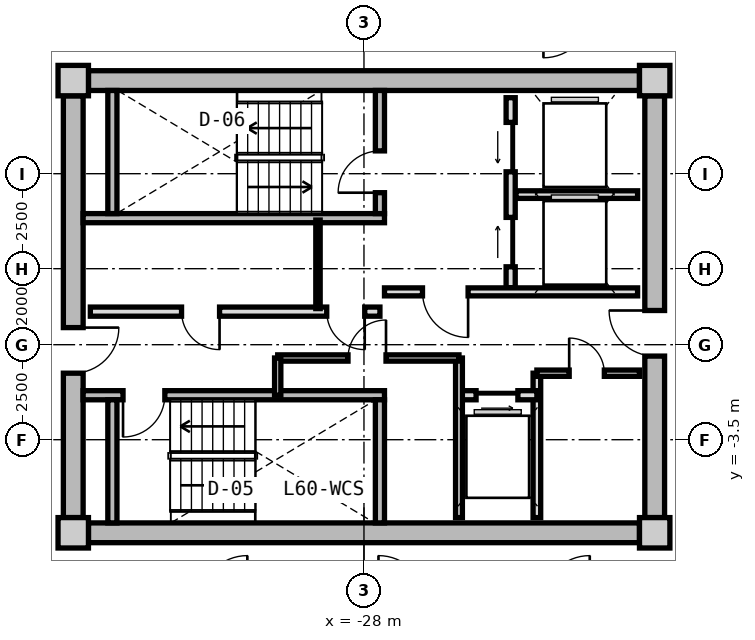
"""IFC4 building model, lengths in metres.
Left out: names, types, materials, properties, quantities, classifications, styles, units other than length and angle.
Written with IfcOpenShell. Run it as: python <this file> out.ifc"""

import sys

from ifc_helpers import new_model, si_unit, direction, frame, frame_2d, origin, origin_2d, place, context, subcontext, project, spatial, rectangle, extrude, source, transform, mapped, element, fill, save


model = new_model("IFC4")
c1 = context("Model", 3, precision=1e-05, world=origin(), true_north=direction((0.0, 1.0)))
c2 = subcontext(c1, "Body", "Model", "MODEL_VIEW")
j1 = project(units=[si_unit("LENGTHUNIT", "METRE"), si_unit("PLANEANGLEUNIT", "RADIAN")], contexts=[c1])
p1 = place(None, origin())
s1 = spatial("IfcSite", under=j1, at=p1, CompositionType="ELEMENT")
p2 = place(p1, origin())
s2 = spatial("IfcBuilding", under=s1, at=p2, CompositionType="ELEMENT")
p3 = place(p2, frame((0.0, 0.0, 193.7)))
s3 = spatial("IfcBuildingStorey", under=s2, at=p3, CompositionType="ELEMENT", Elevation=193.7)
m1 = source(origin(), c2, "Body", "SweptSolid", [
    extrude(rectangle(XDim=0.8, YDim=0.8, at=origin_2d()), origin(), (0.0, 0.0, 1.0), 3.05),
])
for number, where, z_axis, x_axis in (
    (1, (-35.65, -5.95, 0.0), (0.0, 0.0, 1.0), (1.0, 0.0, 0.0)),
    (2, (-20.35, -5.95, 0.0), (0.0, 0.0, 1.0), (1.0, 0.0, 0.0)),
    (3, (-20.35, 5.95, 0.0), (0.0, 0.0, 1.0), (1.0, 0.0, 0.0)),
    (4, (-35.65, 5.95, 0.0), (0.0, 0.0, 1.0), (1.0, 0.0, 0.0)),
):
    element("IfcColumn", number, at=place(p3, frame(where, z_axis=z_axis, x_axis=x_axis)), inside=s3, PredefinedType="COLUMN", context=c2, shape_type="MappedRepresentation", body=[
        mapped(m1, transform((0.0, 0.0, 0.0), x_axis=(1.0, 0.0, 0.0), y_axis=(0.0, 1.0, 0.0), z_axis=(0.0, 0.0, 1.0), scale=1.0)),
    ])
m2 = source(origin(), c2, "Body", "SweptSolid", [
    extrude(rectangle(XDim=14.5, YDim=0.52, at=frame_2d((7.25, 0.0))), origin(), (0.0, 0.0, 1.0), 2.81),
])
for number, where, z_axis, x_axis in (
    (5, (-35.25, 5.95, 0.0), (0.0, 0.0, 1.0), (1.0, 0.0, 0.0)),
    (6, (-20.75, -5.95, 0.0), (0.0, 0.0, 1.0), (-1.0, 0.0, 0.0)),
):
    element("IfcWall", number, at=place(p3, frame(where, z_axis=z_axis, x_axis=x_axis)), inside=s3, PredefinedType="SHEAR", context=c2, shape_type="MappedRepresentation", body=[
        mapped(m2, transform((0.0, 0.0, 0.0), x_axis=(1.0, 0.0, 0.0), y_axis=(0.0, 1.0, 0.0), z_axis=(0.0, 0.0, 1.0), scale=1.0)),
    ])
m3 = source(origin(), c2, "Body", "SweptSolid", [
    extrude(rectangle(XDim=11.1, YDim=0.52, at=frame_2d((5.55, 0.0))), origin(), (0.0, 0.0, 1.0), 2.81),
])
p4 = place(p3, frame((-35.65, -5.55, 0.0), z_axis=(0.0, 0.0, 1.0), x_axis=(0.0, 1.0, 0.0)))
e7 = element("IfcWall", 7, at=p4, inside=s3, PredefinedType="SHEAR", context=c2, shape_type="MappedRepresentation", body=[
    mapped(m3, transform((0.0, 0.0, 0.0), x_axis=(1.0, 0.0, 0.0), y_axis=(0.0, 1.0, 0.0), z_axis=(0.0, 0.0, 1.0), scale=1.0)),
])
p5 = place(p4, frame((3.8, 0.0, 0.0)))
e8 = element("IfcOpeningElement", 8, at=p5, cuts=e7, PredefinedType="OPENING", context=c2, shape_type="SweptSolid", body=[
    extrude(rectangle(XDim=1.2, YDim=2.15, at=frame_2d((0.6, 1.075))), frame((0.0, 0.27, 0.0), z_axis=(0.0, -1.0, 0.0), x_axis=(1.0, 0.0, 0.0)), (0.0, 0.0, 1.0), 0.54),
])
p6 = place(p3, frame((-20.35, 5.55, 0.0), z_axis=(0.0, 0.0, 1.0), x_axis=(0.0, -1.0, 0.0)))
e9 = element("IfcWall", 9, at=p6, inside=s3, PredefinedType="SHEAR", context=c2, shape_type="MappedRepresentation", body=[
    mapped(m3, transform((0.0, 0.0, 0.0), x_axis=(1.0, 0.0, 0.0), y_axis=(0.0, 1.0, 0.0), z_axis=(0.0, 0.0, 1.0), scale=1.0)),
])
p7 = place(p6, frame((5.65, 0.0, 0.0)))
e10 = element("IfcOpeningElement", 10, at=p7, cuts=e9, PredefinedType="OPENING", context=c2, shape_type="SweptSolid", body=[
    extrude(rectangle(XDim=1.2, YDim=2.15, at=frame_2d((0.6, 1.075))), frame((0.0, 0.27, 0.0), z_axis=(0.0, -1.0, 0.0), x_axis=(1.0, 0.0, 0.0)), (0.0, 0.0, 1.0), 0.54),
])
m4 = source(origin(), c2, "Body", "SweptSolid", [
    extrude(rectangle(XDim=7.93, YDim=0.24, at=frame_2d((3.965, 0.0))), origin(), (0.0, 0.0, 1.0), 2.81),
])
p8 = place(p3, frame((-35.39, 2.33, 0.0), z_axis=(0.0, 0.0, 1.0), x_axis=(1.0, 0.0, 0.0)))
e11 = element("IfcWall", 11, at=p8, inside=s3, PredefinedType="PARTITIONING", context=c2, shape_type="MappedRepresentation", body=[
    mapped(m4, transform((0.0, 0.0, 0.0), x_axis=(1.0, 0.0, 0.0), y_axis=(0.0, 1.0, 0.0), z_axis=(0.0, 0.0, 1.0), scale=1.0)),
])
m5 = source(origin(), c2, "Body", "SweptSolid", [
    extrude(rectangle(XDim=3.24, YDim=0.24, at=frame_2d((1.62, 0.0))), origin(), (0.0, 0.0, 1.0), 2.81),
])
p9 = place(p3, frame((-34.62, 2.45, 0.0), z_axis=(0.0, 0.0, 1.0), x_axis=(0.0, 1.0, 0.0)))
e12 = element("IfcWall", 12, at=p9, inside=s3, PredefinedType="PARTITIONING", context=c2, shape_type="MappedRepresentation", body=[
    mapped(m5, transform((0.0, 0.0, 0.0), x_axis=(1.0, 0.0, 0.0), y_axis=(0.0, 1.0, 0.0), z_axis=(0.0, 0.0, 1.0), scale=1.0)),
])
p10 = place(p3, frame((-27.58, 2.45, 0.0), z_axis=(0.0, 0.0, 1.0), x_axis=(0.0, 1.0, 0.0)))
e13 = element("IfcWall", 13, at=p10, inside=s3, PredefinedType="PARTITIONING", context=c2, shape_type="MappedRepresentation", body=[
    mapped(m5, transform((0.0, 0.0, 0.0), x_axis=(1.0, 0.0, 0.0), y_axis=(0.0, 1.0, 0.0), z_axis=(0.0, 0.0, 1.0), scale=1.0)),
])
p11 = place(p10, frame((0.55, 0.0, 0.0)))
e14 = element("IfcOpeningElement", 14, at=p11, cuts=e13, PredefinedType="OPENING", context=c2, shape_type="SweptSolid", body=[
    extrude(rectangle(XDim=1.1, YDim=2.15, at=frame_2d((0.55, 1.075))), frame((0.0, 0.13, 0.0), z_axis=(0.0, -1.0, 0.0), x_axis=(1.0, 0.0, 0.0)), (0.0, 0.0, 1.0), 0.26),
])
p12 = place(p3, frame((-35.39, -2.33, 0.0), z_axis=(0.0, 0.0, 1.0), x_axis=(1.0, 0.0, 0.0)))
e15 = element("IfcWall", 15, at=p12, inside=s3, PredefinedType="PARTITIONING", context=c2, shape_type="MappedRepresentation", body=[
    mapped(m4, transform((0.0, 0.0, 0.0), x_axis=(1.0, 0.0, 0.0), y_axis=(0.0, 1.0, 0.0), z_axis=(0.0, 0.0, 1.0), scale=1.0)),
])
p13 = place(p12, frame((1.05, 0.0, 0.0)))
e16 = element("IfcOpeningElement", 16, at=p13, cuts=e15, PredefinedType="OPENING", context=c2, shape_type="SweptSolid", body=[
    extrude(rectangle(XDim=1.1, YDim=2.15, at=frame_2d((0.55, 1.075))), frame((0.0, 0.13, 0.0), z_axis=(0.0, -1.0, 0.0), x_axis=(1.0, 0.0, 0.0)), (0.0, 0.0, 1.0), 0.26),
])
for number, where, z_axis, x_axis in (
    (17, (-34.62, -5.69, 0.0), (0.0, 0.0, 1.0), (0.0, 1.0, 0.0)),
    (18, (-27.58, -5.69, 0.0), (0.0, 0.0, 1.0), (0.0, 1.0, 0.0)),
):
    element("IfcWall", number, at=place(p3, frame(where, z_axis=z_axis, x_axis=x_axis)), inside=s3, PredefinedType="PARTITIONING", context=c2, shape_type="MappedRepresentation", body=[
        mapped(m5, transform((0.0, 0.0, 0.0), x_axis=(1.0, 0.0, 0.0), y_axis=(0.0, 1.0, 0.0), z_axis=(0.0, 0.0, 1.0), scale=1.0)),
    ])
m6 = source(origin(), c2, "Body", "SweptSolid", [
    extrude(rectangle(XDim=5.0, YDim=0.24, at=frame_2d((2.5, 0.0))), origin(), (0.0, 0.0, 1.0), 2.795),
])
p14 = place(p3, frame((-24.14, 0.5, 0.0), z_axis=(0.0, 0.0, 1.0), x_axis=(0.0, 1.0, 0.0)))
e19 = element("IfcWall", 19, at=p14, inside=s3, PredefinedType="PARTITIONING", context=c2, shape_type="MappedRepresentation", body=[
    mapped(m6, transform((0.0, 0.0, 0.0), x_axis=(1.0, 0.0, 0.0), y_axis=(0.0, 1.0, 0.0), z_axis=(0.0, 0.0, 1.0), scale=1.0)),
])
p15 = place(p14, frame((3.05, 0.0, 0.0)))
e20 = element("IfcOpeningElement", 20, at=p15, cuts=e19, PredefinedType="OPENING", context=c2, shape_type="SweptSolid", body=[
    extrude(rectangle(XDim=1.3, YDim=2.2, at=frame_2d((0.65, 1.1))), frame((0.0, 0.13, 0.0), z_axis=(0.0, -1.0, 0.0), x_axis=(1.0, 0.0, 0.0)), (0.0, 0.0, 1.0), 0.26),
])
p16 = place(p14, frame((0.55, 0.0, 0.0)))
e21 = element("IfcOpeningElement", 21, at=p16, cuts=e19, PredefinedType="OPENING", context=c2, shape_type="SweptSolid", body=[
    extrude(rectangle(XDim=1.3, YDim=2.2, at=frame_2d((0.65, 1.1))), frame((0.0, 0.13, 0.0), z_axis=(0.0, -1.0, 0.0), x_axis=(1.0, 0.0, 0.0)), (0.0, 0.0, 1.0), 0.26),
])
m7 = source(origin(), c2, "Body", "SweptSolid", [
    extrude(rectangle(XDim=3.2, YDim=0.2, at=frame_2d((1.6, 0.0))), origin(), (0.0, 0.0, 1.0), 2.795),
])
p17 = place(p3, frame((-24.0, 2.95, 0.0), z_axis=(0.0, 0.0, 1.0), x_axis=(1.0, 0.0, 0.0)))
e22 = element("IfcWall", 22, at=p17, inside=s3, PredefinedType="PARTITIONING", context=c2, shape_type="MappedRepresentation", body=[
    mapped(m7, transform((0.0, 0.0, 0.0), x_axis=(1.0, 0.0, 0.0), y_axis=(0.0, 1.0, 0.0), z_axis=(0.0, 0.0, 1.0), scale=1.0)),
])
m8 = source(origin(), c2, "Body", "SweptSolid", [
    extrude(rectangle(XDim=6.66, YDim=0.21, at=frame_2d((3.33, 0.0))), origin(), (0.0, 0.0, 1.0), 2.795),
])
p18 = place(p3, frame((-27.46, 0.39, 0.0), z_axis=(0.0, 0.0, 1.0), x_axis=(1.0, 0.0, 0.0)))
e23 = element("IfcWall", 23, at=p18, inside=s3, PredefinedType="PARTITIONING", context=c2, shape_type="MappedRepresentation", body=[
    mapped(m8, transform((0.0, 0.0, 0.0), x_axis=(1.0, 0.0, 0.0), y_axis=(0.0, 1.0, 0.0), z_axis=(0.0, 0.0, 1.0), scale=1.0)),
])
p19 = place(p18, frame((1.0, 0.0, 0.0)))
e24 = element("IfcOpeningElement", 24, at=p19, cuts=e23, PredefinedType="OPENING", context=c2, shape_type="SweptSolid", body=[
    extrude(rectangle(XDim=1.2, YDim=2.15, at=frame_2d((0.6, 1.075))), frame((0.0, 0.115, 0.0), z_axis=(0.0, -1.0, 0.0), x_axis=(1.0, 0.0, 0.0)), (0.0, 0.0, 1.0), 0.23),
])
m9 = source(origin(), c2, "Body", "SweptSolid", [
    extrude(rectangle(XDim=7.62, YDim=0.24, at=frame_2d((3.81, 0.0))), origin(), (0.0, 0.0, 1.0), 2.795),
])
p20 = place(p3, frame((-35.2, -0.13, 0.0), z_axis=(0.0, 0.0, 1.0), x_axis=(1.0, 0.0, 0.0)))
e25 = element("IfcWall", 25, at=p20, inside=s3, PredefinedType="PARTITIONING", context=c2, shape_type="MappedRepresentation", body=[
    mapped(m9, transform((0.0, 0.0, 0.0), x_axis=(1.0, 0.0, 0.0), y_axis=(0.0, 1.0, 0.0), z_axis=(0.0, 0.0, 1.0), scale=1.0)),
])
p21 = place(p20, frame((6.22, 0.0, 0.0)))
e26 = element("IfcOpeningElement", 26, at=p21, cuts=e25, PredefinedType="OPENING", context=c2, shape_type="SweptSolid", body=[
    extrude(rectangle(XDim=1.0, YDim=2.1, at=frame_2d((0.5, 1.05))), frame((0.0, 0.13, 0.0), z_axis=(0.0, -1.0, 0.0), x_axis=(1.0, 0.0, 0.0)), (0.0, 0.0, 1.0), 0.26),
])
p22 = place(p20, frame((2.4, 0.0, 0.0)))
e27 = element("IfcOpeningElement", 27, at=p22, cuts=e25, PredefinedType="OPENING", context=c2, shape_type="SweptSolid", body=[
    extrude(rectangle(XDim=1.0, YDim=2.1, at=frame_2d((0.5, 1.05))), frame((0.0, 0.13, 0.0), z_axis=(0.0, -1.0, 0.0), x_axis=(1.0, 0.0, 0.0)), (0.0, 0.0, 1.0), 0.26),
])
m10 = source(origin(), c2, "Body", "SweptSolid", [
    extrude(rectangle(XDim=2.33, YDim=0.115, at=frame_2d((1.165, 0.0))), origin(), (0.0, 0.0, 1.0), 2.795),
])
p23 = place(p3, frame((-29.21, -0.05, 0.0), z_axis=(0.0, 0.0, 1.0), x_axis=(0.0, 1.0, 0.0)))
e28 = element("IfcWall", 28, at=p23, inside=s3, PredefinedType="PARTITIONING", context=c2, shape_type="MappedRepresentation", body=[
    mapped(m10, transform((0.0, 0.0, 0.0), x_axis=(1.0, 0.0, 0.0), y_axis=(0.0, 1.0, 0.0), z_axis=(0.0, 0.0, 1.0), scale=1.0)),
])
m11 = source(origin(), c2, "Body", "SweptSolid", [
    extrude(rectangle(XDim=3.8, YDim=0.2, at=frame_2d((1.9, 0.0))), origin(), (0.0, 0.0, 1.0), 2.795),
])
p24 = place(p3, frame((-23.45, -5.55, 0.0), z_axis=(0.0, 0.0, 1.0), x_axis=(0.0, 1.0, 0.0)))
e29 = element("IfcWall", 29, at=p24, inside=s3, PredefinedType="PARTITIONING", context=c2, shape_type="MappedRepresentation", body=[
    mapped(m11, transform((0.0, 0.0, 0.0), x_axis=(1.0, 0.0, 0.0), y_axis=(0.0, 1.0, 0.0), z_axis=(0.0, 0.0, 1.0), scale=1.0)),
])
m12 = source(origin(), c2, "Body", "SweptSolid", [
    extrude(rectangle(XDim=2.05, YDim=0.24, at=frame_2d((1.025, 0.0))), origin(), (0.0, 0.0, 1.0), 2.795),
])
p25 = place(p3, frame((-25.5, -2.33, 0.0), z_axis=(0.0, 0.0, 1.0), x_axis=(1.0, 0.0, 0.0)))
e30 = element("IfcWall", 30, at=p25, inside=s3, PredefinedType="PARTITIONING", context=c2, shape_type="MappedRepresentation", body=[
    mapped(m12, transform((0.0, 0.0, 0.0), x_axis=(1.0, 0.0, 0.0), y_axis=(0.0, 1.0, 0.0), z_axis=(0.0, 0.0, 1.0), scale=1.0)),
])
p26 = place(p25, frame((0.45, 0.0, 0.0)))
e31 = element("IfcOpeningElement", 31, at=p26, cuts=e30, PredefinedType="OPENING", context=c2, shape_type="SweptSolid", body=[
    extrude(rectangle(XDim=1.1, YDim=2.2, at=frame_2d((0.55, 1.1))), frame((0.0, 0.13, 0.0), z_axis=(0.0, -1.0, 0.0), x_axis=(1.0, 0.0, 0.0)), (0.0, 0.0, 1.0), 0.26),
])
m13 = source(origin(), c2, "Body", "SweptSolid", [
    extrude(rectangle(XDim=4.2, YDim=0.18, at=frame_2d((2.1, 0.0))), origin(), (0.0, 0.0, 1.0), 2.795),
])
p27 = place(p3, frame((-25.5, -5.55, 0.0), z_axis=(0.0, 0.0, 1.0), x_axis=(0.0, 1.0, 0.0)))
e32 = element("IfcWall", 32, at=p27, inside=s3, PredefinedType="PARTITIONING", context=c2, shape_type="MappedRepresentation", body=[
    mapped(m13, transform((0.0, 0.0, 0.0), x_axis=(1.0, 0.0, 0.0), y_axis=(0.0, 1.0, 0.0), z_axis=(0.0, 0.0, 1.0), scale=1.0)),
])
m14 = source(origin(), c2, "Body", "SweptSolid", [
    extrude(rectangle(XDim=4.77, YDim=0.165, at=frame_2d((2.385, 0.0))), origin(), (0.0, 0.0, 1.0), 2.795),
])
p28 = place(p3, frame((-30.27, -1.35, 0.0), z_axis=(0.0, 0.0, 1.0), x_axis=(1.0, 0.0, 0.0)))
e33 = element("IfcWall", 33, at=p28, inside=s3, PredefinedType="PARTITIONING", context=c2, shape_type="MappedRepresentation", body=[
    mapped(m14, transform((0.0, 0.0, 0.0), x_axis=(1.0, 0.0, 0.0), y_axis=(0.0, 1.0, 0.0), z_axis=(0.0, 0.0, 1.0), scale=1.0)),
])
p29 = place(p28, frame((1.85, 0.0, 0.0)))
e34 = element("IfcOpeningElement", 34, at=p29, cuts=e33, PredefinedType="OPENING", context=c2, shape_type="SweptSolid", body=[
    extrude(rectangle(XDim=1.0, YDim=2.1, at=frame_2d((0.5, 1.05))), frame((0.0, 0.093, 0.0), z_axis=(0.0, -1.0, 0.0), x_axis=(1.0, 0.0, 0.0)), (0.0, 0.0, 1.0), 0.185),
])
m15 = source(origin(), c2, "Body", "SweptSolid", [
    extrude(rectangle(XDim=0.98, YDim=0.165, at=frame_2d((0.49, 0.0))), origin(), (0.0, 0.0, 1.0), 2.795),
])
p30 = place(p3, frame((-30.27, -2.33, 0.0), z_axis=(0.0, 0.0, 1.0), x_axis=(0.0, 1.0, 0.0)))
e35 = element("IfcWall", 35, at=p30, inside=s3, PredefinedType="PARTITIONING", context=c2, shape_type="MappedRepresentation", body=[
    mapped(m15, transform((0.0, 0.0, 0.0), x_axis=(1.0, 0.0, 0.0), y_axis=(0.0, 1.0, 0.0), z_axis=(0.0, 0.0, 1.0), scale=1.0)),
])
m16 = source(origin(), c2, "Body", "SweptSolid", [
    extrude(rectangle(XDim=2.7, YDim=0.165, at=frame_2d((1.35, 0.0))), origin(), (0.0, 0.0, 1.0), 2.795),
])
p31 = place(p3, frame((-23.45, -1.75, 0.0), z_axis=(0.0, 0.0, 1.0), x_axis=(1.0, 0.0, 0.0)))
e36 = element("IfcWall", 36, at=p31, inside=s3, PredefinedType="PARTITIONING", context=c2, shape_type="MappedRepresentation", body=[
    mapped(m16, transform((0.0, 0.0, 0.0), x_axis=(1.0, 0.0, 0.0), y_axis=(0.0, 1.0, 0.0), z_axis=(0.0, 0.0, 1.0), scale=1.0)),
])
p32 = place(p31, frame((0.85, 0.0, 0.0)))
e37 = element("IfcOpeningElement", 37, at=p32, cuts=e36, PredefinedType="OPENING", context=c2, shape_type="SweptSolid", body=[
    extrude(rectangle(XDim=0.925, YDim=2.1, at=frame_2d((0.462, 1.05))), frame((0.0, 0.093, 0.0), z_axis=(0.0, -1.0, 0.0), x_axis=(1.0, 0.0, 0.0)), (0.0, 0.0, 1.0), 0.185),
])
m17 = source(origin(), c2, "Body", "SweptSolid", [
    extrude(rectangle(XDim=1.1, YDim=2.15, at=frame_2d((0.55, 1.075))), frame((0.0, 0.025, 0.0), z_axis=(0.0, -1.0, 0.0), x_axis=(1.0, 0.0, 0.0)), (0.0, 0.0, 1.0), 0.05),
])
p33 = place(p11, origin())
e38 = element("IfcDoor", 38, at=p33, inside=s3, OperationType="SINGLE_SWING_LEFT", PredefinedType="DOOR", context=c2, shape_type="MappedRepresentation", body=[
    mapped(m17, transform((0.0, 0.0, 0.0), x_axis=(1.0, 0.0, 0.0), y_axis=(0.0, 1.0, 0.0), z_axis=(0.0, 0.0, 1.0), scale=1.0)),
])
fill(e14, e38)
p34 = place(p13, frame((1.1, 0.0, 0.0), z_axis=(0.0, 0.0, 1.0), x_axis=(-1.0, 0.0, 0.0)))
e39 = element("IfcDoor", 39, at=p34, inside=s3, OperationType="SINGLE_SWING_RIGHT", PredefinedType="DOOR", context=c2, shape_type="MappedRepresentation", body=[
    mapped(m17, transform((0.0, 0.0, 0.0), x_axis=(1.0, 0.0, 0.0), y_axis=(0.0, 1.0, 0.0), z_axis=(0.0, 0.0, 1.0), scale=1.0)),
])
fill(e16, e39)
m18 = source(origin(), c2, "Body", "SweptSolid", [
    extrude(rectangle(XDim=1.3, YDim=2.2, at=frame_2d((0.65, 1.1))), frame((0.0, 0.025, 0.0), z_axis=(0.0, -1.0, 0.0), x_axis=(1.0, 0.0, 0.0)), (0.0, 0.0, 1.0), 0.05),
])
p35 = place(p15, origin())
e40 = element("IfcDoor", 40, at=p35, inside=s3, OperationType="SLIDING_TO_LEFT", PredefinedType="DOOR", context=c2, shape_type="MappedRepresentation", body=[
    mapped(m18, transform((0.0, 0.0, 0.0), x_axis=(1.0, 0.0, 0.0), y_axis=(0.0, 1.0, 0.0), z_axis=(0.0, 0.0, 1.0), scale=1.0)),
])
fill(e20, e40)
p36 = place(p16, origin())
e41 = element("IfcDoor", 41, at=p36, inside=s3, OperationType="SLIDING_TO_RIGHT", PredefinedType="DOOR", context=c2, shape_type="MappedRepresentation", body=[
    mapped(m18, transform((0.0, 0.0, 0.0), x_axis=(1.0, 0.0, 0.0), y_axis=(0.0, 1.0, 0.0), z_axis=(0.0, 0.0, 1.0), scale=1.0)),
])
fill(e21, e41)
m19 = source(origin(), c2, "Body", "SweptSolid", [
    extrude(rectangle(XDim=1.2, YDim=2.15, at=frame_2d((0.6, 1.075))), frame((0.0, 0.025, 0.0), z_axis=(0.0, -1.0, 0.0), x_axis=(1.0, 0.0, 0.0)), (0.0, 0.0, 1.0), 0.05),
])
p37 = place(p19, frame((1.2, 0.0, 0.0), z_axis=(0.0, 0.0, 1.0), x_axis=(-1.0, 0.0, 0.0)))
e42 = element("IfcDoor", 42, at=p37, inside=s3, OperationType="SINGLE_SWING_LEFT", PredefinedType="DOOR", context=c2, shape_type="MappedRepresentation", body=[
    mapped(m19, transform((0.0, 0.0, 0.0), x_axis=(1.0, 0.0, 0.0), y_axis=(0.0, 1.0, 0.0), z_axis=(0.0, 0.0, 1.0), scale=1.0)),
])
fill(e24, e42)
p38 = place(p5, frame((1.2, 0.0, 0.0), z_axis=(0.0, 0.0, 1.0), x_axis=(-1.0, 0.0, 0.0)))
e43 = element("IfcDoor", 43, at=p38, inside=s3, OperationType="SINGLE_SWING_LEFT", PredefinedType="DOOR", context=c2, shape_type="MappedRepresentation", body=[
    mapped(m19, transform((0.0, 0.0, 0.0), x_axis=(1.0, 0.0, 0.0), y_axis=(0.0, 1.0, 0.0), z_axis=(0.0, 0.0, 1.0), scale=1.0)),
])
fill(e8, e43)
p39 = place(p7, frame((1.2, 0.0, 0.0), z_axis=(0.0, 0.0, 1.0), x_axis=(-1.0, 0.0, 0.0)))
e44 = element("IfcDoor", 44, at=p39, inside=s3, OperationType="SINGLE_SWING_RIGHT", PredefinedType="DOOR", context=c2, shape_type="MappedRepresentation", body=[
    mapped(m19, transform((0.0, 0.0, 0.0), x_axis=(1.0, 0.0, 0.0), y_axis=(0.0, 1.0, 0.0), z_axis=(0.0, 0.0, 1.0), scale=1.0)),
])
fill(e10, e44)
m20 = source(origin(), c2, "Body", "SweptSolid", [
    extrude(rectangle(XDim=1.0, YDim=2.1, at=frame_2d((0.5, 1.05))), frame((0.0, 0.025, 0.0), z_axis=(0.0, -1.0, 0.0), x_axis=(1.0, 0.0, 0.0)), (0.0, 0.0, 1.0), 0.05),
])
p40 = place(p21, frame((1.0, 0.0, 0.0), z_axis=(0.0, 0.0, 1.0), x_axis=(-1.0, 0.0, 0.0)))
e45 = element("IfcDoor", 45, at=p40, inside=s3, OperationType="SINGLE_SWING_LEFT", PredefinedType="DOOR", context=c2, shape_type="MappedRepresentation", body=[
    mapped(m20, transform((0.0, 0.0, 0.0), x_axis=(1.0, 0.0, 0.0), y_axis=(0.0, 1.0, 0.0), z_axis=(0.0, 0.0, 1.0), scale=1.0)),
])
fill(e26, e45)
p41 = place(p22, frame((1.0, 0.0, 0.0), z_axis=(0.0, 0.0, 1.0), x_axis=(-1.0, 0.0, 0.0)))
e46 = element("IfcDoor", 46, at=p41, inside=s3, OperationType="SINGLE_SWING_LEFT", PredefinedType="DOOR", context=c2, shape_type="MappedRepresentation", body=[
    mapped(m20, transform((0.0, 0.0, 0.0), x_axis=(1.0, 0.0, 0.0), y_axis=(0.0, 1.0, 0.0), z_axis=(0.0, 0.0, 1.0), scale=1.0)),
])
fill(e27, e46)
m21 = source(origin(), c2, "Body", "SweptSolid", [
    extrude(rectangle(XDim=1.1, YDim=2.2, at=frame_2d((0.55, 1.1))), frame((0.0, 0.025, 0.0), z_axis=(0.0, -1.0, 0.0), x_axis=(1.0, 0.0, 0.0)), (0.0, 0.0, 1.0), 0.05),
])
p42 = place(p26, frame((1.1, 0.0, 0.0), z_axis=(0.0, 0.0, 1.0), x_axis=(-1.0, 0.0, 0.0)))
e47 = element("IfcDoor", 47, at=p42, inside=s3, OperationType="SLIDING_TO_RIGHT", PredefinedType="DOOR", context=c2, shape_type="MappedRepresentation", body=[
    mapped(m21, transform((0.0, 0.0, 0.0), x_axis=(1.0, 0.0, 0.0), y_axis=(0.0, 1.0, 0.0), z_axis=(0.0, 0.0, 1.0), scale=1.0)),
])
fill(e31, e47)
p43 = place(p29, origin())
e48 = element("IfcDoor", 48, at=p43, inside=s3, OperationType="SINGLE_SWING_RIGHT", PredefinedType="DOOR", context=c2, shape_type="MappedRepresentation", body=[
    mapped(m20, transform((0.0, 0.0, 0.0), x_axis=(1.0, 0.0, 0.0), y_axis=(0.0, 1.0, 0.0), z_axis=(0.0, 0.0, 1.0), scale=1.0)),
])
fill(e34, e48)
m22 = source(origin(), c2, "Body", "SweptSolid", [
    extrude(rectangle(XDim=0.925, YDim=2.1, at=frame_2d((0.462, 1.05))), frame((0.0, 0.025, 0.0), z_axis=(0.0, -1.0, 0.0), x_axis=(1.0, 0.0, 0.0)), (0.0, 0.0, 1.0), 0.05),
])
p44 = place(p32, origin())
e49 = element("IfcDoor", 49, at=p44, inside=s3, OperationType="SINGLE_SWING_LEFT", PredefinedType="DOOR", context=c2, shape_type="MappedRepresentation", body=[
    mapped(m22, transform((0.0, 0.0, 0.0), x_axis=(1.0, 0.0, 0.0), y_axis=(0.0, 1.0, 0.0), z_axis=(0.0, 0.0, 1.0), scale=1.0)),
])
fill(e37, e49)
save(model, sys.argv[1])
